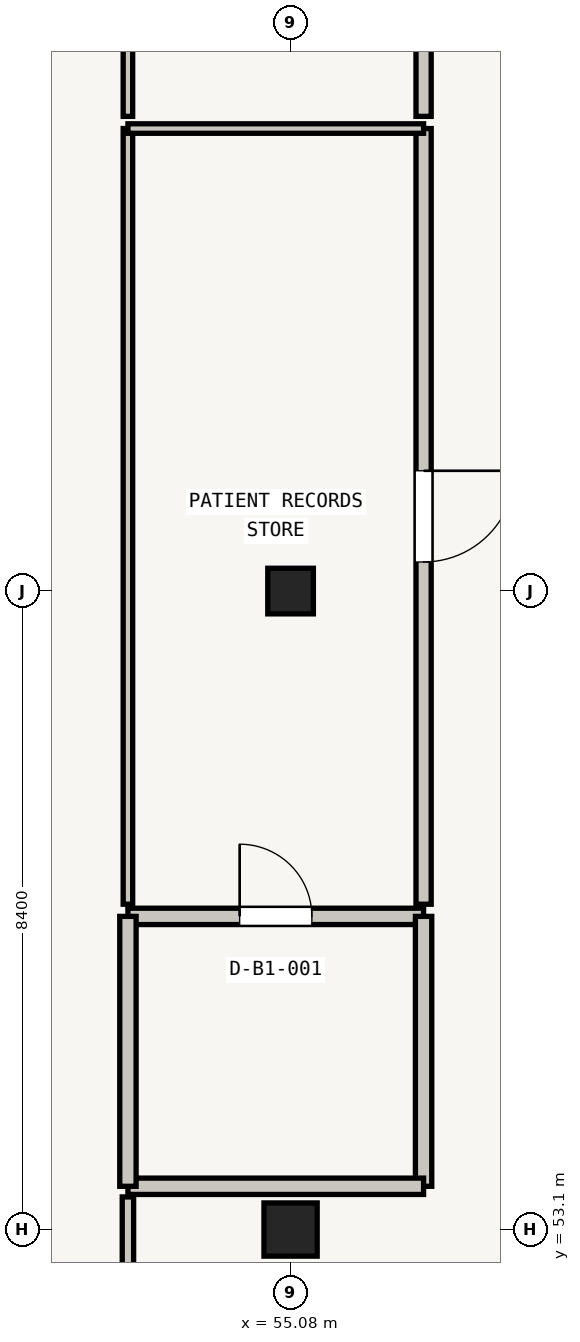
"""IFC4 building model, lengths in metres.
Left out: names, types, materials, properties, quantities, classifications, styles, units other than length and angle.
Written with IfcOpenShell. Run it as: python <this file> out.ifc"""

import sys

from ifc_helpers import new_model, si_unit, direction, frame, frame_2d, origin, origin_2d, place, context, subcontext, project, spatial, rectangle, circle, extrude, element, fill, save


model = new_model("IFC4")
c1 = context("Model", 3, precision=1e-05, world=origin(), true_north=direction((0.0, 1.0)))
c2 = subcontext(c1, "Body", "Model", "MODEL_VIEW")
j1 = project(units=[si_unit("LENGTHUNIT", "METRE"), si_unit("PLANEANGLEUNIT", "RADIAN")], contexts=[c1])
p1 = place(None, origin())
s1 = spatial("IfcSite", under=j1, at=p1, CompositionType="ELEMENT")
p2 = place(p1, origin())
s2 = spatial("IfcBuilding", under=s1, at=p2, CompositionType="ELEMENT")
p3 = place(p2, frame((0.0, 0.0, -4.5)))
s3 = spatial("IfcBuildingStorey", under=s2, at=p3, CompositionType="ELEMENT", Elevation=-4.5)
p4 = place(p3, frame((55.08, 53.1, -0.42), z_axis=(0.0, 0.0, 1.0), x_axis=(1.0, 0.0, 0.0)))
e1 = element("IfcColumn", 1, at=p4, inside=s3, PredefinedType="COLUMN", context=c2, shape_type="SweptSolid", body=[
    extrude(circle(Radius=0.35, at=origin_2d()), origin(), (0.0, 0.0, 1.0), 4.64),
])
p5 = place(p3, frame((55.08, 61.5, -0.42), z_axis=(0.0, 0.0, 1.0), x_axis=(1.0, 0.0, 0.0)))
e2 = element("IfcColumn", 2, at=p5, inside=s3, PredefinedType="COLUMN", context=c2, shape_type="SweptSolid", body=[
    extrude(circle(Radius=0.3, at=origin_2d()), origin(), (0.0, 0.0, 1.0), 4.64),
])
p6 = place(p3, frame((52.94, 57.22, 0.0), z_axis=(0.0, 0.0, 1.0), x_axis=(1.0, 0.0, 0.0)))
e3 = element("IfcWall", 3, at=p6, inside=s3, PredefinedType="PLUMBINGWALL", context=c2, shape_type="SweptSolid", body=[
    extrude(rectangle(XDim=3.89, YDim=0.215, at=frame_2d((1.945, 0.0))), origin(), (0.0, 0.0, 1.0), 3.24),
])
p7 = place(p6, frame((1.47, 0.0, 0.0)))
e4 = element("IfcOpeningElement", 4, at=p7, cuts=e3, PredefinedType="OPENING", context=c2, shape_type="SweptSolid", body=[
    extrude(rectangle(XDim=0.95, YDim=2.05, at=frame_2d((0.475, 1.025))), frame((0.0, 0.107, 0.0), z_axis=(0.0, -1.0, 0.0), x_axis=(1.0, 0.0, 0.0)), (0.0, 0.0, 1.0), 0.215),
])
p8 = place(p3, frame((56.83, 57.22, 0.0), z_axis=(0.0, 0.0, 1.0), x_axis=(0.0, -1.0, 0.0)))
e5 = element("IfcWall", 5, at=p8, inside=s3, PredefinedType="PLUMBINGWALL", context=c2, shape_type="SweptSolid", body=[
    extrude(rectangle(XDim=3.551, YDim=0.215, at=frame_2d((1.775, 0.0))), origin(), (0.0, 0.0, 1.0), 3.24),
])
p9 = place(p3, frame((56.83, 53.669, 0.0), z_axis=(0.0, 0.0, 1.0), x_axis=(-1.0, 0.0, 0.0)))
e6 = element("IfcWall", 6, at=p9, inside=s3, PredefinedType="PLUMBINGWALL", context=c2, shape_type="SweptSolid", body=[
    extrude(rectangle(XDim=3.89, YDim=0.215, at=frame_2d((1.945, 0.0))), origin(), (0.0, 0.0, 1.0), 3.24),
])
p10 = place(p3, frame((52.94, 53.669, 0.0), z_axis=(0.0, 0.0, 1.0), x_axis=(0.0, 1.0, 0.0)))
e7 = element("IfcWall", 7, at=p10, inside=s3, PredefinedType="PLUMBINGWALL", context=c2, shape_type="SweptSolid", body=[
    extrude(rectangle(XDim=3.551, YDim=0.215, at=frame_2d((1.775, 0.0))), origin(), (0.0, 0.0, 1.0), 3.24),
])
p11 = place(p3, frame((52.94, 41.6, 0.0), z_axis=(0.0, 0.0, 1.0), x_axis=(0.0, 1.0, 0.0)))
e8 = element("IfcWall", 8, at=p11, inside=s3, PredefinedType="PARTITIONING", context=c2, shape_type="SweptSolid", body=[
    extrude(rectangle(XDim=11.929, YDim=0.15, at=frame_2d((5.964, 0.0))), origin(), (0.0, 0.0, 1.0), 3.24),
])
p12 = place(p11, frame((5.445, 0.0, 0.0)))
e9 = element("IfcOpeningElement", 9, at=p12, cuts=e8, PredefinedType="OPENING", context=c2, shape_type="SweptSolid", body=[
    extrude(rectangle(XDim=1.04, YDim=2.05, at=frame_2d((0.52, 1.025))), frame((0.0, 0.075, 0.0), z_axis=(0.0, -1.0, 0.0), x_axis=(1.0, 0.0, 0.0)), (0.0, 0.0, 1.0), 0.15),
])
p13 = place(p3, frame((56.83, 67.585, 0.0), z_axis=(0.0, 0.0, 1.0), x_axis=(0.0, -1.0, 0.0)))
e10 = element("IfcWall", 10, at=p13, inside=s3, PredefinedType="SOLIDWALL", context=c2, shape_type="SweptSolid", body=[
    extrude(rectangle(XDim=10.205, YDim=0.2, at=frame_2d((5.103, 0.0))), origin(), (0.0, 0.0, 1.0), 3.24),
])
p14 = place(p13, frame((4.502, 0.0, 0.0)))
e11 = element("IfcOpeningElement", 11, at=p14, cuts=e10, PredefinedType="OPENING", context=c2, shape_type="SweptSolid", body=[
    extrude(rectangle(XDim=1.2, YDim=2.05, at=frame_2d((0.6, 1.025))), frame((0.0, 0.1, 0.0), z_axis=(0.0, -1.0, 0.0), x_axis=(1.0, 0.0, 0.0)), (0.0, 0.0, 1.0), 0.2),
])
p15 = place(p3, frame((52.94, 57.38, 0.0), z_axis=(0.0, 0.0, 1.0), x_axis=(0.0, 1.0, 0.0)))
e12 = element("IfcWall", 12, at=p15, inside=s3, PredefinedType="PARTITIONING", context=c2, shape_type="SweptSolid", body=[
    extrude(rectangle(XDim=10.205, YDim=0.125, at=frame_2d((5.103, 0.0))), origin(), (0.0, 0.0, 1.0), 3.24),
])
p16 = place(p3, frame((52.94, 67.585, 0.0), z_axis=(0.0, 0.0, 1.0), x_axis=(1.0, 0.0, 0.0)))
e13 = element("IfcWall", 13, at=p16, inside=s3, PredefinedType="PARTITIONING", context=c2, shape_type="SweptSolid", body=[
    extrude(rectangle(XDim=3.89, YDim=0.125, at=frame_2d((1.945, 0.0))), origin(), (0.0, 0.0, 1.0), 3.24),
])
p17 = place(p3, frame((56.83, 77.95, 0.0), z_axis=(0.0, 0.0, 1.0), x_axis=(0.0, -1.0, 0.0)))
e14 = element("IfcWall", 14, at=p17, inside=s3, PredefinedType="SOLIDWALL", context=c2, shape_type="SweptSolid", body=[
    extrude(rectangle(XDim=10.205, YDim=0.2, at=frame_2d((5.103, 0.0))), origin(), (0.0, 0.0, 1.0), 3.24),
])
p18 = place(p17, frame((4.502, 0.0, 0.0)))
e15 = element("IfcOpeningElement", 15, at=p18, cuts=e14, PredefinedType="OPENING", context=c2, shape_type="SweptSolid", body=[
    extrude(rectangle(XDim=1.2, YDim=2.05, at=frame_2d((0.6, 1.025))), frame((0.0, 0.1, 0.0), z_axis=(0.0, -1.0, 0.0), x_axis=(1.0, 0.0, 0.0)), (0.0, 0.0, 1.0), 0.2),
])
p19 = place(p3, frame((52.94, 67.745, 0.0), z_axis=(0.0, 0.0, 1.0), x_axis=(0.0, 1.0, 0.0)))
e16 = element("IfcWall", 16, at=p19, inside=s3, PredefinedType="PARTITIONING", context=c2, shape_type="SweptSolid", body=[
    extrude(rectangle(XDim=10.205, YDim=0.125, at=frame_2d((5.103, 0.0))), origin(), (0.0, 0.0, 1.0), 3.24),
])
p20 = place(p7, origin())
e17 = element("IfcDoor", 17, at=p20, inside=s3, OperationType="SINGLE_SWING_LEFT", PredefinedType="DOOR", context=c2, shape_type="SweptSolid", body=[
    extrude(rectangle(XDim=0.95, YDim=2.05, at=frame_2d((0.475, 1.025))), frame((0.0, 0.025, 0.0), z_axis=(0.0, -1.0, 0.0), x_axis=(1.0, 0.0, 0.0)), (0.0, 0.0, 1.0), 0.05),
])
fill(e4, e17)
p21 = place(p14, origin())
e18 = element("IfcDoor", 18, at=p21, inside=s3, OperationType="SINGLE_SWING_LEFT", PredefinedType="DOOR", context=c2, shape_type="SweptSolid", body=[
    extrude(rectangle(XDim=1.2, YDim=2.05, at=frame_2d((0.6, 1.025))), frame((0.0, 0.025, 0.0), z_axis=(0.0, -1.0, 0.0), x_axis=(1.0, 0.0, 0.0)), (0.0, 0.0, 1.0), 0.05),
])
fill(e11, e18)
save(model, sys.argv[1])
